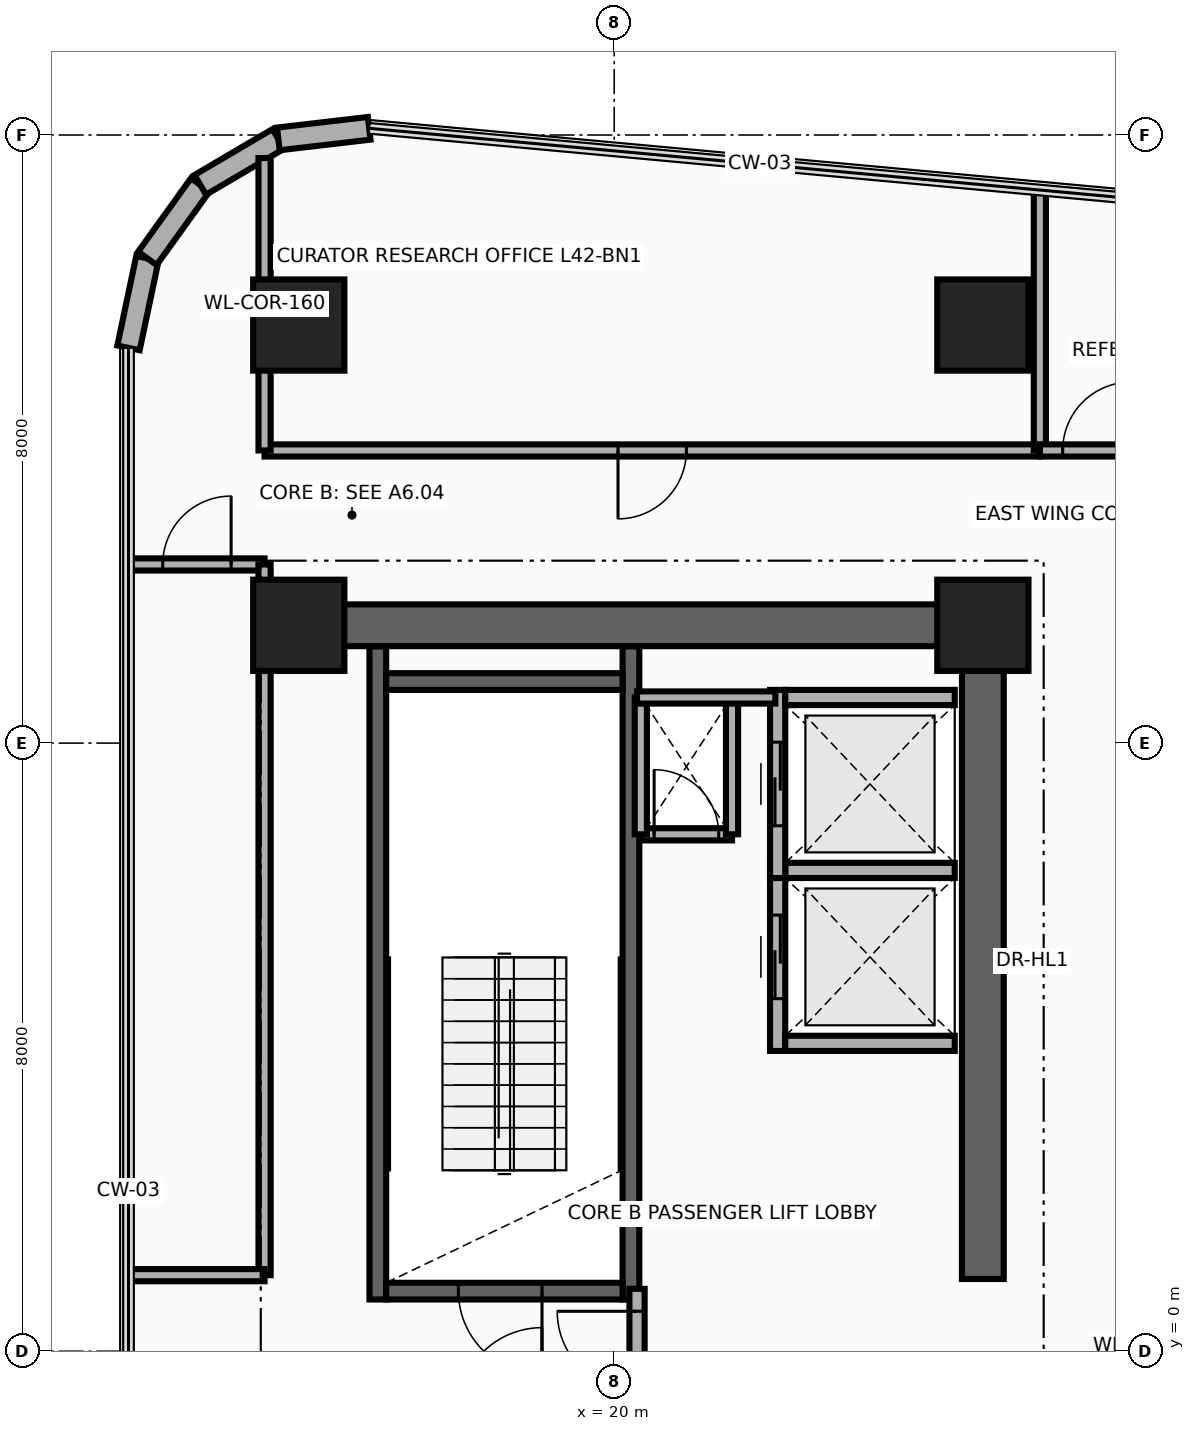
"""IFC4 building model, lengths in metres.
Left out: names, types, materials, properties, quantities, classifications, styles, units other than length and angle.
Written with IfcOpenShell. Run it as: python <this file> out.ifc"""

import sys

from ifc_helpers import new_model, si_unit, direction, frame, frame_2d, origin, origin_2d, place, context, subcontext, project, spatial, rectangle, extrude, source, transform, mapped, element, fill, save


model = new_model("IFC4")
c1 = context("Model", 3, precision=1e-05, world=origin(), true_north=direction((0.0, 1.0)))
c2 = subcontext(c1, "Body", "Model", "MODEL_VIEW")
j1 = project(units=[si_unit("LENGTHUNIT", "METRE"), si_unit("PLANEANGLEUNIT", "RADIAN")], contexts=[c1])
p1 = place(None, origin())
s1 = spatial("IfcSite", under=j1, at=p1, CompositionType="ELEMENT")
p2 = place(p1, origin())
s2 = spatial("IfcBuilding", under=s1, at=p2, CompositionType="ELEMENT")
p3 = place(p2, frame((0.0, 0.0, 164.9)))
s3 = spatial("IfcBuildingStorey", under=s2, at=p3, CompositionType="ELEMENT", Elevation=164.9)
for number, where, z_axis, x_axis in (
    (1, (16.89, 0.68, 0.0), (0.0, 0.0, 1.0), (0.0, 1.0, 0.0)),
    (2, (20.22, 0.68, 0.0), (0.0, 0.0, 1.0), (0.0, 1.0, 0.0)),
):
    element("IfcWall", number, at=place(p3, frame(where, z_axis=z_axis, x_axis=x_axis)), inside=s3, PredefinedType="SHEAR", context=c2, shape_type="SweptSolid", body=[
        extrude(rectangle(XDim=8.595, YDim=0.22, at=frame_2d((4.297, 0.0))), origin(), (0.0, 0.0, 1.0), 3.46),
    ])
p4 = place(p3, frame((17.0, 0.79, 0.0), z_axis=(0.0, 0.0, 1.0), x_axis=(1.0, 0.0, 0.0)))
e3 = element("IfcWall", 3, at=p4, inside=s3, PredefinedType="SHEAR", context=c2, shape_type="SweptSolid", body=[
    extrude(rectangle(XDim=3.11, YDim=0.22, at=frame_2d((1.555, 0.0))), origin(), (0.0, 0.0, 1.0), 3.46),
])
p5 = place(p4, frame((0.95, 0.0, 0.0)))
e4 = element("IfcOpeningElement", 4, at=p5, cuts=e3, PredefinedType="OPENING", context=c2, shape_type="SweptSolid", body=[
    extrude(rectangle(XDim=1.1, YDim=2.15, at=frame_2d((0.55, 1.075))), frame((0.0, 0.125, 0.0), z_axis=(0.0, -1.0, 0.0), x_axis=(1.0, 0.0, 0.0)), (0.0, 0.0, 1.0), 0.25),
])
p6 = place(p3, frame((17.0, 8.81, 0.0), z_axis=(0.0, 0.0, 1.0), x_axis=(1.0, 0.0, 0.0)))
e5 = element("IfcWall", 5, at=p6, inside=s3, PredefinedType="SHEAR", context=c2, shape_type="SweptSolid", body=[
    extrude(rectangle(XDim=3.11, YDim=0.22, at=frame_2d((1.555, 0.0))), origin(), (0.0, 0.0, 1.0), 3.46),
])
p7 = place(p3, frame((24.85, 0.95, 0.0), z_axis=(0.0, 0.0, 1.0), x_axis=(0.0, 1.0, 0.0)))
e6 = element("IfcWall", 6, at=p7, inside=s3, PredefinedType="SHEAR", context=c2, shape_type="SweptSolid", body=[
    extrude(rectangle(XDim=8.875, YDim=0.55, at=frame_2d((4.438, 0.0))), origin(), (0.0, 0.0, 1.0), 3.46),
])
p8 = place(p3, frame((15.85, 9.55, 0.0), z_axis=(0.0, 0.0, 1.0), x_axis=(1.0, 0.0, 0.0)))
e7 = element("IfcWall", 7, at=p8, inside=s3, PredefinedType="SHEAR", context=c2, shape_type="SweptSolid", body=[
    extrude(rectangle(XDim=9.0, YDim=0.55, at=frame_2d((4.5, 0.0))), origin(), (0.0, 0.0, 1.0), 3.46),
])
m1 = source(origin(), c2, "Body", "SweptSolid", [
    extrude(rectangle(XDim=1.2, YDim=1.2, at=origin_2d()), origin(), (0.0, 0.0, 1.0), 3.7),
])
for number, where, z_axis, x_axis in (
    (8, (15.85, 9.55, 0.0), (0.0, 0.0, 1.0), (1.0, 0.0, 0.0)),
    (9, (24.85, 9.55, 0.0), (0.0, 0.0, 1.0), (1.0, 0.0, 0.0)),
    (10, (15.85, 13.5, 0.0), (0.0, 0.0, 1.0), (1.0, 0.0, 0.0)),
    (11, (24.85, 13.5, 0.0), (0.0, 0.0, 1.0), (1.0, 0.0, 0.0)),
):
    element("IfcColumn", number, at=place(p3, frame(where, z_axis=z_axis, x_axis=x_axis)), inside=s3, PredefinedType="COLUMN", context=c2, shape_type="MappedRepresentation", body=[
        mapped(m1, transform((0.0, 0.0, 0.0), x_axis=(1.0, 0.0, 0.0), y_axis=(0.0, 1.0, 0.0), z_axis=(0.0, 0.0, 1.0), scale=1.0)),
    ])
p9 = place(p3, frame((13.61, 13.2, 0.0), z_axis=(0.0, 0.0, 1.0), x_axis=(0.206133180315, 0.978523945529, 0.0)))
e12 = element("IfcWall", 12, at=p9, inside=s3, PredefinedType="SOLIDWALL", context=c2, shape_type="SweptSolid", body=[
    extrude(rectangle(XDim=1.203, YDim=0.3, at=frame_2d((0.602, 0.0))), origin(), (0.0, 0.0, 1.0), 3.46),
])
for number, where, z_axis, x_axis in (
    (13, (13.858, 14.377, 0.0), (0.0, 0.0, 1.0), (0.584, 0.812, 0.0)),
    (14, (14.554, 15.344, 0.0), (0.0, 0.0, 1.0), (0.862, 0.507, 0.0)),
):
    element("IfcWall", number, at=place(p3, frame(where, z_axis=z_axis, x_axis=x_axis)), inside=s3, PredefinedType="SOLIDWALL", context=c2, shape_type="SweptSolid", body=[
        extrude(rectangle(XDim=1.192, YDim=0.3, at=frame_2d((0.596, 0.0))), origin(), (0.0, 0.0, 1.0), 3.46),
    ])
p10 = place(p3, frame((15.581, 15.949, 0.0), z_axis=(0.0, 0.0, 1.0), x_axis=(0.993288417722, 0.115663819837, 0.0)))
e15 = element("IfcWall", 15, at=p10, inside=s3, PredefinedType="SOLIDWALL", context=c2, shape_type="SweptSolid", body=[
    extrude(rectangle(XDim=1.203, YDim=0.3, at=frame_2d((0.602, 0.0))), origin(), (0.0, 0.0, 1.0), 3.46),
])
p11 = place(p3, frame((22.15, 3.95, 0.0), z_axis=(0.0, 0.0, 1.0), x_axis=(0.0, 1.0, 0.0)))
e16 = element("IfcWall", 16, at=p11, inside=s3, PredefinedType="MOVABLE", context=c2, shape_type="SweptSolid", body=[
    extrude(rectangle(XDim=2.475, YDim=0.2, at=frame_2d((1.238, 0.0))), origin(), (0.0, 0.0, 1.0), 3.46),
])
p12 = place(p11, frame((0.688, 0.0, 0.0)))
e17 = element("IfcOpeningElement", 17, at=p12, cuts=e16, PredefinedType="OPENING", context=c2, shape_type="SweptSolid", body=[
    extrude(rectangle(XDim=1.1, YDim=2.1, at=frame_2d((0.55, 1.05))), frame((0.0, 0.115, 0.0), z_axis=(0.0, -1.0, 0.0), x_axis=(1.0, 0.0, 0.0)), (0.0, 0.0, 1.0), 0.23),
])
for number, where, z_axis, x_axis in (
    (18, (22.25, 4.05, 0.0), (0.0, 0.0, 1.0), (1.0, 0.0, 0.0)),
    (19, (22.25, 6.325, 0.0), (0.0, 0.0, 1.0), (1.0, 0.0, 0.0)),
):
    element("IfcWall", number, at=place(p3, frame(where, z_axis=z_axis, x_axis=x_axis)), inside=s3, PredefinedType="MOVABLE", context=c2, shape_type="SweptSolid", body=[
        extrude(rectangle(XDim=2.23, YDim=0.2, at=frame_2d((1.115, 0.0))), origin(), (0.0, 0.0, 1.0), 3.46),
    ])
p13 = place(p3, frame((22.15, 6.225, 0.0), z_axis=(0.0, 0.0, 1.0), x_axis=(0.0, 1.0, 0.0)))
e20 = element("IfcWall", 20, at=p13, inside=s3, PredefinedType="MOVABLE", context=c2, shape_type="SweptSolid", body=[
    extrude(rectangle(XDim=2.475, YDim=0.2, at=frame_2d((1.237, 0.0))), origin(), (0.0, 0.0, 1.0), 3.46),
])
p14 = place(p13, frame((0.688, 0.0, 0.0)))
e21 = element("IfcOpeningElement", 21, at=p14, cuts=e20, PredefinedType="OPENING", context=c2, shape_type="SweptSolid", body=[
    extrude(rectangle(XDim=1.1, YDim=2.1, at=frame_2d((0.55, 1.05))), frame((0.0, 0.115, 0.0), z_axis=(0.0, -1.0, 0.0), x_axis=(1.0, 0.0, 0.0)), (0.0, 0.0, 1.0), 0.23),
])
p15 = place(p3, frame((22.25, 8.6, 0.0), z_axis=(0.0, 0.0, 1.0), x_axis=(1.0, 0.0, 0.0)))
e22 = element("IfcWall", 22, at=p15, inside=s3, PredefinedType="MOVABLE", context=c2, shape_type="SweptSolid", body=[
    extrude(rectangle(XDim=2.23, YDim=0.2, at=frame_2d((1.115, 0.0))), origin(), (0.0, 0.0, 1.0), 3.46),
])
p16 = place(p3, frame((20.3, -0.82, 0.0), z_axis=(0.0, 0.0, 1.0), x_axis=(0.0, 1.0, 0.0)))
e23 = element("IfcWall", 23, at=p16, inside=s3, PredefinedType="PARTITIONING", context=c2, shape_type="SweptSolid", body=[
    extrude(rectangle(XDim=1.64, YDim=0.2, at=frame_2d((0.82, 0.0))), origin(), (0.0, 0.0, 1.0), 3.46),
])
p17 = place(p16, frame((0.295, 0.0, 0.0)))
e24 = element("IfcOpeningElement", 24, at=p17, cuts=e23, PredefinedType="OPENING", context=c2, shape_type="SweptSolid", body=[
    extrude(rectangle(XDim=1.05, YDim=2.15, at=frame_2d((0.525, 1.075))), frame((0.0, 0.115, 0.0), z_axis=(0.0, -1.0, 0.0), x_axis=(1.0, 0.0, 0.0)), (0.0, 0.0, 1.0), 0.23),
])
p18 = place(p3, frame((20.35, 6.8, 0.0), z_axis=(0.0, 0.0, 1.0), x_axis=(1.0, 0.0, 0.0)))
e25 = element("IfcWall", 25, at=p18, inside=s3, PredefinedType="PARTITIONING", context=c2, shape_type="SweptSolid", body=[
    extrude(rectangle(XDim=1.2, YDim=0.16, at=frame_2d((0.6, 0.0))), origin(), (0.0, 0.0, 1.0), 3.46),
])
p19 = place(p18, frame((0.175, 0.0, 0.0)))
e26 = element("IfcOpeningElement", 26, at=p19, cuts=e25, PredefinedType="OPENING", context=c2, shape_type="SweptSolid", body=[
    extrude(rectangle(XDim=0.85, YDim=2.05, at=frame_2d((0.425, 1.025))), frame((0.0, 0.095, 0.0), z_axis=(0.0, -1.0, 0.0), x_axis=(1.0, 0.0, 0.0)), (0.0, 0.0, 1.0), 0.19),
])
for number, where, z_axis, x_axis in (
    (27, (21.55, 6.8, 0.0), (0.0, 0.0, 1.0), (0.0, 1.0, 0.0)),
    (28, (20.35, 6.8, 0.0), (0.0, 0.0, 1.0), (0.0, 1.0, 0.0)),
):
    element("IfcWall", number, at=place(p3, frame(where, z_axis=z_axis, x_axis=x_axis)), inside=s3, PredefinedType="PARTITIONING", context=c2, shape_type="SweptSolid", body=[
        extrude(rectangle(XDim=1.8, YDim=0.16, at=frame_2d((0.9, 0.0))), origin(), (0.0, 0.0, 1.0), 3.46),
    ])
p20 = place(p3, frame((20.3, 8.6, 0.0), z_axis=(0.0, 0.0, 1.0), x_axis=(1.0, 0.0, 0.0)))
e29 = element("IfcWall", 29, at=p20, inside=s3, PredefinedType="PARTITIONING", context=c2, shape_type="SweptSolid", body=[
    extrude(rectangle(XDim=1.82, YDim=0.16, at=frame_2d((0.91, 0.0))), origin(), (0.0, 0.0, 1.0), 3.46),
])
p21 = place(p3, frame((15.4, 11.85, 0.0), z_axis=(0.0, 0.0, 1.0), x_axis=(1.0, 0.0, 0.0)))
e30 = element("IfcWall", 30, at=p21, inside=s3, PredefinedType="PARTITIONING", context=c2, shape_type="SweptSolid", body=[
    extrude(rectangle(XDim=10.2, YDim=0.16, at=frame_2d((5.1, 0.0))), origin(), (0.0, 0.0, 1.0), 2.834),
])
p22 = place(p21, frame((4.65, 0.0, 0.0)))
e31 = element("IfcOpeningElement", 31, at=p22, cuts=e30, PredefinedType="OPENING", context=c2, shape_type="SweptSolid", body=[
    extrude(rectangle(XDim=0.9, YDim=2.1, at=frame_2d((0.45, 1.05))), frame((0.0, 0.095, 0.0), z_axis=(0.0, -1.0, 0.0), x_axis=(1.0, 0.0, 0.0)), (0.0, 0.0, 1.0), 0.19),
])
p23 = place(p3, frame((15.4, 11.85, 0.0), z_axis=(0.0, 0.0, 1.0), x_axis=(0.0, 1.0, 0.0)))
e32 = element("IfcWall", 32, at=p23, inside=s3, PredefinedType="PARTITIONING", context=c2, shape_type="SweptSolid", body=[
    extrude(rectangle(XDim=3.847, YDim=0.16, at=frame_2d((1.923, 0.0))), origin(), (0.0, 0.0, 1.0), 3.46),
])
p24 = place(p3, frame((25.6, 11.85, 0.0), z_axis=(0.0, 0.0, 1.0), x_axis=(0.0, 1.0, 0.0)))
e33 = element("IfcWall", 33, at=p24, inside=s3, PredefinedType="PARTITIONING", context=c2, shape_type="SweptSolid", body=[
    extrude(rectangle(XDim=3.426, YDim=0.16, at=frame_2d((1.713, 0.0))), origin(), (0.0, 0.0, 1.0), 2.666),
])
p25 = place(p3, frame((25.6, 11.85, 0.0), z_axis=(0.0, 0.0, 1.0), x_axis=(1.0, 0.0, 0.0)))
e34 = element("IfcWall", 34, at=p25, inside=s3, PredefinedType="PARTITIONING", context=c2, shape_type="SweptSolid", body=[
    extrude(rectangle(XDim=4.09, YDim=0.16, at=frame_2d((2.045, 0.0))), origin(), (0.0, 0.0, 1.0), 2.896),
])
p26 = place(p25, frame((0.3, 0.0, 0.0)))
e35 = element("IfcOpeningElement", 35, at=p26, cuts=e34, PredefinedType="OPENING", context=c2, shape_type="SweptSolid", body=[
    extrude(rectangle(XDim=0.9, YDim=2.1, at=frame_2d((0.45, 1.05))), frame((0.0, 0.095, 0.0), z_axis=(0.0, -1.0, 0.0), x_axis=(1.0, 0.0, 0.0)), (0.0, 0.0, 1.0), 0.19),
])
p27 = place(p3, frame((13.61, 10.35, 0.0), z_axis=(0.0, 0.0, 1.0), x_axis=(1.0, 0.0, 0.0)))
e36 = element("IfcWall", 36, at=p27, inside=s3, PredefinedType="PARTITIONING", context=c2, shape_type="SweptSolid", body=[
    extrude(rectangle(XDim=1.79, YDim=0.16, at=frame_2d((0.895, 0.0))), origin(), (0.0, 0.0, 1.0), 3.46),
])
p28 = place(p27, frame((0.45, 0.0, 0.0)))
e37 = element("IfcOpeningElement", 37, at=p28, cuts=e36, PredefinedType="OPENING", context=c2, shape_type="SweptSolid", body=[
    extrude(rectangle(XDim=0.9, YDim=2.1, at=frame_2d((0.45, 1.05))), frame((0.0, 0.095, 0.0), z_axis=(0.0, -1.0, 0.0), x_axis=(1.0, 0.0, 0.0)), (0.0, 0.0, 1.0), 0.19),
])
p29 = place(p3, frame((15.4, 1.0, 0.0), z_axis=(0.0, 0.0, 1.0), x_axis=(0.0, 1.0, 0.0)))
e38 = element("IfcWall", 38, at=p29, inside=s3, PredefinedType="PARTITIONING", context=c2, shape_type="SweptSolid", body=[
    extrude(rectangle(XDim=9.35, YDim=0.16, at=frame_2d((4.675, 0.0))), origin(), (0.0, 0.0, 1.0), 3.46),
])
p30 = place(p3, frame((13.61, 1.0, 0.0), z_axis=(0.0, 0.0, 1.0), x_axis=(1.0, 0.0, 0.0)))
e39 = element("IfcWall", 39, at=p30, inside=s3, PredefinedType="PARTITIONING", context=c2, shape_type="SweptSolid", body=[
    extrude(rectangle(XDim=1.79, YDim=0.16, at=frame_2d((0.895, 0.0))), origin(), (0.0, 0.0, 1.0), 3.46),
])
p31 = place(p12, origin())
e40 = element("IfcDoor", 40, at=p31, inside=s3, OperationType="DOUBLE_DOOR_SLIDING", PredefinedType="DOOR", context=c2, shape_type="SweptSolid", body=[
    extrude(rectangle(XDim=1.1, YDim=2.1, at=frame_2d((0.55, 1.05))), frame((0.0, 0.025, 0.0), z_axis=(0.0, -1.0, 0.0), x_axis=(1.0, 0.0, 0.0)), (0.0, 0.0, 1.0), 0.05),
])
fill(e17, e40)
p32 = place(p14, origin())
e41 = element("IfcDoor", 41, at=p32, inside=s3, OperationType="DOUBLE_DOOR_SLIDING", PredefinedType="DOOR", context=c2, shape_type="SweptSolid", body=[
    extrude(rectangle(XDim=1.1, YDim=2.1, at=frame_2d((0.55, 1.05))), frame((0.0, 0.025, 0.0), z_axis=(0.0, -1.0, 0.0), x_axis=(1.0, 0.0, 0.0)), (0.0, 0.0, 1.0), 0.05),
])
fill(e21, e41)
p33 = place(p17, origin())
e42 = element("IfcDoor", 42, at=p33, inside=s3, OperationType="SINGLE_SWING_RIGHT", PredefinedType="DOOR", context=c2, shape_type="SweptSolid", body=[
    extrude(rectangle(XDim=1.05, YDim=2.15, at=frame_2d((0.525, 1.075))), frame((0.0, 0.025, 0.0), z_axis=(0.0, -1.0, 0.0), x_axis=(1.0, 0.0, 0.0)), (0.0, 0.0, 1.0), 0.05),
])
fill(e24, e42)
p34 = place(p5, frame((1.1, 0.0, 0.0), z_axis=(0.0, 0.0, 1.0), x_axis=(-1.0, 0.0, 0.0)))
e43 = element("IfcDoor", 43, at=p34, inside=s3, OperationType="SINGLE_SWING_LEFT", PredefinedType="DOOR", context=c2, shape_type="SweptSolid", body=[
    extrude(rectangle(XDim=1.1, YDim=2.15, at=frame_2d((0.55, 1.075))), frame((0.0, 0.025, 0.0), z_axis=(0.0, -1.0, 0.0), x_axis=(1.0, 0.0, 0.0)), (0.0, 0.0, 1.0), 0.05),
])
fill(e4, e43)
p35 = place(p19, origin())
e44 = element("IfcDoor", 44, at=p35, inside=s3, OperationType="SINGLE_SWING_LEFT", PredefinedType="DOOR", context=c2, shape_type="SweptSolid", body=[
    extrude(rectangle(XDim=0.85, YDim=2.05, at=frame_2d((0.425, 1.025))), frame((0.0, 0.025, 0.0), z_axis=(0.0, -1.0, 0.0), x_axis=(1.0, 0.0, 0.0)), (0.0, 0.0, 1.0), 0.05),
])
fill(e26, e44)
p36 = place(p22, frame((0.9, 0.0, 0.0), z_axis=(0.0, 0.0, 1.0), x_axis=(-1.0, 0.0, 0.0)))
e45 = element("IfcDoor", 45, at=p36, inside=s3, OperationType="SINGLE_SWING_LEFT", PredefinedType="DOOR", context=c2, shape_type="SweptSolid", body=[
    extrude(rectangle(XDim=0.9, YDim=2.1, at=frame_2d((0.45, 1.05))), frame((0.0, 0.025, 0.0), z_axis=(0.0, -1.0, 0.0), x_axis=(1.0, 0.0, 0.0)), (0.0, 0.0, 1.0), 0.05),
])
fill(e31, e45)
p37 = place(p26, origin())
e46 = element("IfcDoor", 46, at=p37, inside=s3, OperationType="SINGLE_SWING_LEFT", PredefinedType="DOOR", context=c2, shape_type="SweptSolid", body=[
    extrude(rectangle(XDim=0.9, YDim=2.1, at=frame_2d((0.45, 1.05))), frame((0.0, 0.025, 0.0), z_axis=(0.0, -1.0, 0.0), x_axis=(1.0, 0.0, 0.0)), (0.0, 0.0, 1.0), 0.05),
])
fill(e35, e46)
p38 = place(p28, origin())
e47 = element("IfcDoor", 47, at=p38, inside=s3, OperationType="SINGLE_SWING_RIGHT", PredefinedType="DOOR", context=c2, shape_type="SweptSolid", body=[
    extrude(rectangle(XDim=0.9, YDim=2.1, at=frame_2d((0.45, 1.05))), frame((0.0, 0.025, 0.0), z_axis=(0.0, -1.0, 0.0), x_axis=(1.0, 0.0, 0.0)), (0.0, 0.0, 1.0), 0.05),
])
fill(e37, e47)
save(model, sys.argv[1])
